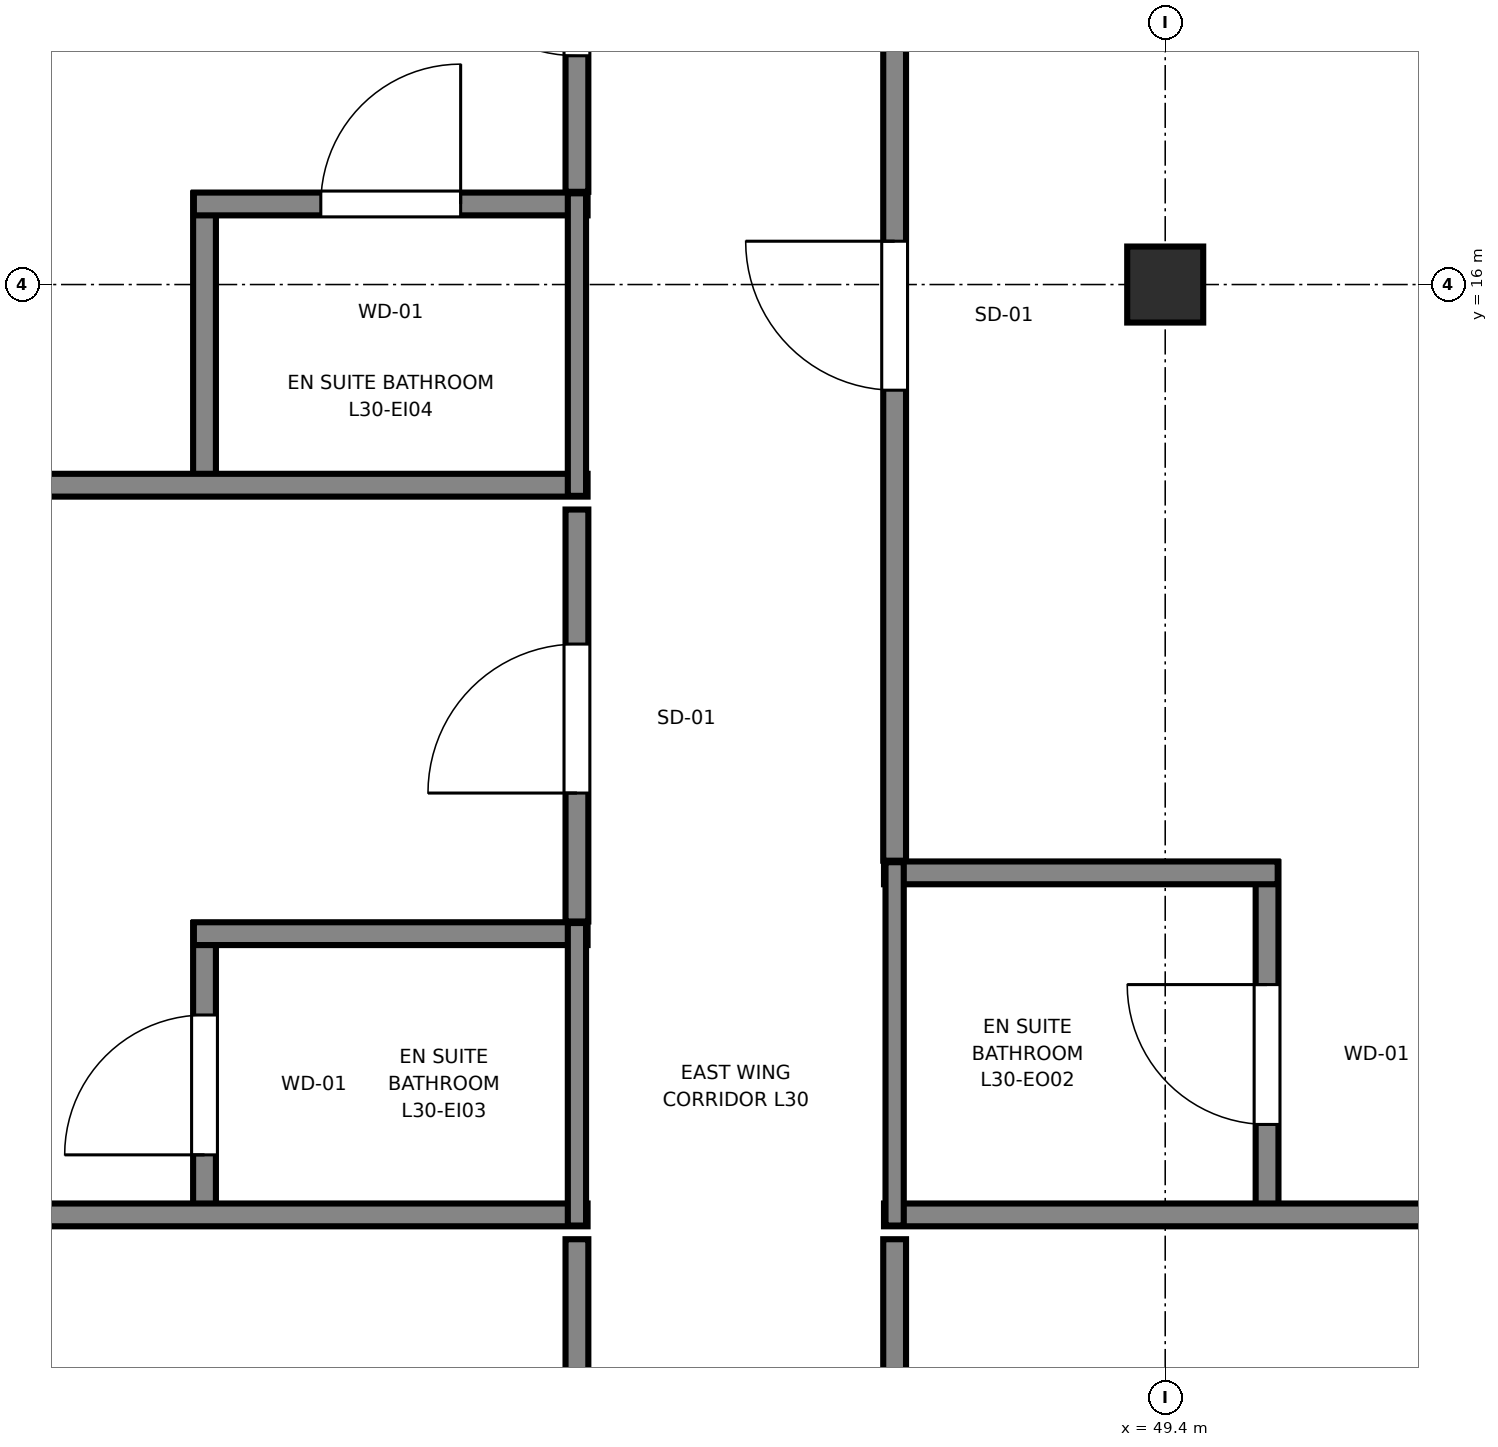
"""IFC4 building model, lengths in metres.
Left out: names, types, materials, properties, quantities, classifications, styles, units other than length and angle.
Written with IfcOpenShell. Run it as: python <this file> out.ifc"""

import sys

from ifc_helpers import new_model, si_unit, direction, frame, frame_2d, origin, origin_2d, place, context, subcontext, project, spatial, rectangle, i_section, extrude, source, transform, mapped, element, fill, save


model = new_model("IFC4")
c1 = context("Model", 3, precision=1e-05, world=origin(), true_north=direction((0.0, 1.0)))
c2 = subcontext(c1, "Body", "Model", "MODEL_VIEW")
j1 = project(units=[si_unit("LENGTHUNIT", "METRE"), si_unit("PLANEANGLEUNIT", "RADIAN")], contexts=[c1])
p1 = place(None, origin())
s1 = spatial("IfcSite", under=j1, at=p1, CompositionType="ELEMENT")
p2 = place(p1, origin())
s2 = spatial("IfcBuilding", under=s1, at=p2, CompositionType="ELEMENT")
p3 = place(p2, frame((0.0, 0.0, 118.65)))
s3 = spatial("IfcBuildingStorey", under=s2, at=p3, CompositionType="ELEMENT", Elevation=118.65)
m1 = source(origin(), c2, "Body", "SweptSolid", [
    extrude(i_section(OverallWidth=0.5, OverallDepth=0.5, WebThickness=0.022, FlangeThickness=0.034, at=origin_2d()), origin(), (0.0, 0.0, 1.0), 3.55),
])
p4 = place(p3, frame((49.4, 16.0, 0.0), z_axis=(0.0, 0.0, 1.0), x_axis=(1.0, 0.0, 0.0)))
e1 = element("IfcColumn", 1, at=p4, inside=s3, PredefinedType="COLUMN", context=c2, shape_type="MappedRepresentation", body=[
    mapped(m1, transform((0.0, 0.0, 0.0), x_axis=(1.0, 0.0, 0.0), y_axis=(0.0, 1.0, 0.0), z_axis=(0.0, 0.0, 1.0), scale=1.0)),
])
p5 = place(p3, frame((43.08, 9.81, 0.0), z_axis=(0.0, 0.0, 1.0), x_axis=(0.0, 1.0, 0.0)))
e2 = element("IfcWall", 2, at=p5, inside=s3, PredefinedType="PARTITIONING", context=c2, shape_type="SweptSolid", body=[
    extrude(rectangle(XDim=1.99, YDim=0.15, at=frame_2d((0.995, 0.0))), origin(), (0.0, 0.0, 1.0), 3.37),
])
p6 = place(p5, frame((0.465, 0.0, 0.0)))
e3 = element("IfcOpeningElement", 3, at=p6, cuts=e2, PredefinedType="OPENING", context=c2, shape_type="SweptSolid", body=[
    extrude(rectangle(XDim=0.92, YDim=2.01, at=frame_2d((0.46, 1.005))), frame((0.0, 0.085, 0.0), z_axis=(0.0, -1.0, 0.0), x_axis=(1.0, 0.0, 0.0)), (0.0, 0.0, 1.0), 0.17),
])
p7 = place(p3, frame((34.65, 9.88, 0.0), z_axis=(0.0, 0.0, 1.0), x_axis=(1.0, 0.0, 0.0)))
e4 = element("IfcWall", 4, at=p7, inside=s3, PredefinedType="PARTITIONING", context=c2, shape_type="SweptSolid", body=[
    extrude(rectangle(XDim=10.95, YDim=0.15, at=frame_2d((5.475, 0.0))), origin(), (0.0, 0.0, 1.0), 3.37),
])
p8 = place(p3, frame((43.01, 11.73, 0.0), z_axis=(0.0, 0.0, 1.0), x_axis=(1.0, 0.0, 0.0)))
e5 = element("IfcWall", 5, at=p8, inside=s3, PredefinedType="PARTITIONING", context=c2, shape_type="SweptSolid", body=[
    extrude(rectangle(XDim=2.59, YDim=0.15, at=frame_2d((1.295, 0.0))), origin(), (0.0, 0.0, 1.0), 3.37),
])
p9 = place(p3, frame((45.53, 9.81, 0.0), z_axis=(0.0, 0.0, 1.0), x_axis=(0.0, 1.0, 0.0)))
e6 = element("IfcWall", 6, at=p9, inside=s3, PredefinedType="PLUMBINGWALL", context=c2, shape_type="SweptSolid", body=[
    extrude(rectangle(XDim=1.99, YDim=0.12, at=frame_2d((0.995, 0.0))), origin(), (0.0, 0.0, 1.0), 2.954),
])
p10 = place(p3, frame((43.08, 14.61, 0.0), z_axis=(0.0, 0.0, 1.0), x_axis=(0.0, 1.0, 0.0)))
e7 = element("IfcWall", 7, at=p10, inside=s3, PredefinedType="PARTITIONING", context=c2, shape_type="SweptSolid", body=[
    extrude(rectangle(XDim=1.99, YDim=0.15, at=frame_2d((0.995, 0.0))), origin(), (0.0, 0.0, 1.0), 3.37),
])
p11 = place(p3, frame((34.65, 14.68, 0.0), z_axis=(0.0, 0.0, 1.0), x_axis=(1.0, 0.0, 0.0)))
e8 = element("IfcWall", 8, at=p11, inside=s3, PredefinedType="PARTITIONING", context=c2, shape_type="SweptSolid", body=[
    extrude(rectangle(XDim=10.95, YDim=0.15, at=frame_2d((5.475, 0.0))), origin(), (0.0, 0.0, 1.0), 3.37),
])
p12 = place(p3, frame((43.01, 16.53, 0.0), z_axis=(0.0, 0.0, 1.0), x_axis=(1.0, 0.0, 0.0)))
e9 = element("IfcWall", 9, at=p12, inside=s3, PredefinedType="PARTITIONING", context=c2, shape_type="SweptSolid", body=[
    extrude(rectangle(XDim=2.59, YDim=0.15, at=frame_2d((1.295, 0.0))), origin(), (0.0, 0.0, 1.0), 3.37),
])
p13 = place(p12, frame((0.835, 0.0, 0.0)))
e10 = element("IfcOpeningElement", 10, at=p13, cuts=e9, PredefinedType="OPENING", context=c2, shape_type="SweptSolid", body=[
    extrude(rectangle(XDim=0.92, YDim=2.01, at=frame_2d((0.46, 1.005))), frame((0.0, 0.085, 0.0), z_axis=(0.0, -1.0, 0.0), x_axis=(1.0, 0.0, 0.0)), (0.0, 0.0, 1.0), 0.17),
])
p14 = place(p3, frame((45.53, 14.61, 0.0), z_axis=(0.0, 0.0, 1.0), x_axis=(0.0, 1.0, 0.0)))
e11 = element("IfcWall", 11, at=p14, inside=s3, PredefinedType="PLUMBINGWALL", context=c2, shape_type="SweptSolid", body=[
    extrude(rectangle(XDim=1.99, YDim=0.12, at=frame_2d((0.995, 0.0))), origin(), (0.0, 0.0, 1.0), 2.954),
])
p15 = place(p3, frame((50.07, 9.81, 0.0), z_axis=(0.0, 0.0, 1.0), x_axis=(0.0, 1.0, 0.0)))
e12 = element("IfcWall", 12, at=p15, inside=s3, PredefinedType="PARTITIONING", context=c2, shape_type="SweptSolid", body=[
    extrude(rectangle(XDim=2.39, YDim=0.15, at=frame_2d((1.195, 0.0))), origin(), (0.0, 0.0, 1.0), 3.37),
])
p16 = place(p15, frame((0.665, 0.0, 0.0)))
e13 = element("IfcOpeningElement", 13, at=p16, cuts=e12, PredefinedType="OPENING", context=c2, shape_type="SweptSolid", body=[
    extrude(rectangle(XDim=0.92, YDim=2.01, at=frame_2d((0.46, 1.005))), frame((0.0, 0.085, 0.0), z_axis=(0.0, -1.0, 0.0), x_axis=(1.0, 0.0, 0.0)), (0.0, 0.0, 1.0), 0.17),
])
p17 = place(p3, frame((47.55, 9.88, 0.0), z_axis=(0.0, 0.0, 1.0), x_axis=(1.0, 0.0, 0.0)))
e14 = element("IfcWall", 14, at=p17, inside=s3, PredefinedType="PARTITIONING", context=c2, shape_type="SweptSolid", body=[
    extrude(rectangle(XDim=9.045, YDim=0.15, at=frame_2d((4.522, 0.0))), origin(), (0.0, 0.0, 1.0), 3.37),
])
p18 = place(p3, frame((47.55, 12.13, 0.0), z_axis=(0.0, 0.0, 1.0), x_axis=(1.0, 0.0, 0.0)))
e15 = element("IfcWall", 15, at=p18, inside=s3, PredefinedType="PARTITIONING", context=c2, shape_type="SweptSolid", body=[
    extrude(rectangle(XDim=2.59, YDim=0.15, at=frame_2d((1.295, 0.0))), origin(), (0.0, 0.0, 1.0), 3.37),
])
p19 = place(p3, frame((47.62, 9.81, 0.0), z_axis=(0.0, 0.0, 1.0), x_axis=(0.0, 1.0, 0.0)))
e16 = element("IfcWall", 16, at=p19, inside=s3, PredefinedType="PLUMBINGWALL", context=c2, shape_type="SweptSolid", body=[
    extrude(rectangle(XDim=2.39, YDim=0.12, at=frame_2d((1.195, 0.0))), origin(), (0.0, 0.0, 1.0), 3.37),
])
p20 = place(p3, frame((45.53, 6.91, 0.0), z_axis=(0.0, 0.0, 1.0), x_axis=(0.0, 1.0, 0.0)))
e17 = element("IfcWall", 17, at=p20, inside=s3, PredefinedType="PARTITIONING", context=c2, shape_type="SweptSolid", body=[
    extrude(rectangle(XDim=2.81, YDim=0.15, at=frame_2d((1.405, 0.0))), origin(), (0.0, 0.0, 1.0), 2.954),
])
p21 = place(p20, frame((0.895, 0.0, 0.0)))
e18 = element("IfcOpeningElement", 18, at=p21, cuts=e17, PredefinedType="OPENING", context=c2, shape_type="SweptSolid", body=[
    extrude(rectangle(XDim=0.98, YDim=2.12, at=frame_2d((0.49, 1.06))), frame((0.0, 0.085, 0.0), z_axis=(0.0, -1.0, 0.0), x_axis=(1.0, 0.0, 0.0)), (0.0, 0.0, 1.0), 0.17),
])
p22 = place(p3, frame((45.53, 11.81, 0.0), z_axis=(0.0, 0.0, 1.0), x_axis=(0.0, 1.0, 0.0)))
e19 = element("IfcWall", 19, at=p22, inside=s3, PredefinedType="PARTITIONING", context=c2, shape_type="SweptSolid", body=[
    extrude(rectangle(XDim=2.71, YDim=0.15, at=frame_2d((1.355, 0.0))), origin(), (0.0, 0.0, 1.0), 2.954),
])
p23 = place(p22, frame((0.845, 0.0, 0.0)))
e20 = element("IfcOpeningElement", 20, at=p23, cuts=e19, PredefinedType="OPENING", context=c2, shape_type="SweptSolid", body=[
    extrude(rectangle(XDim=0.98, YDim=2.12, at=frame_2d((0.49, 1.06))), frame((0.0, 0.085, 0.0), z_axis=(0.0, -1.0, 0.0), x_axis=(1.0, 0.0, 0.0)), (0.0, 0.0, 1.0), 0.17),
])
p24 = place(p3, frame((45.53, 16.61, 0.0), z_axis=(0.0, 0.0, 1.0), x_axis=(0.0, 1.0, 0.0)))
e21 = element("IfcWall", 21, at=p24, inside=s3, PredefinedType="PARTITIONING", context=c2, shape_type="SweptSolid", body=[
    extrude(rectangle(XDim=2.81, YDim=0.15, at=frame_2d((1.405, 0.0))), origin(), (0.0, 0.0, 1.0), 2.954),
])
p25 = place(p24, frame((0.895, 0.0, 0.0)))
e22 = element("IfcOpeningElement", 22, at=p25, cuts=e21, PredefinedType="OPENING", context=c2, shape_type="SweptSolid", body=[
    extrude(rectangle(XDim=0.98, YDim=2.12, at=frame_2d((0.49, 1.06))), frame((0.0, 0.085, 0.0), z_axis=(0.0, -1.0, 0.0), x_axis=(1.0, 0.0, 0.0)), (0.0, 0.0, 1.0), 0.17),
])
p26 = place(p3, frame((47.62, 3.31, 0.0), z_axis=(0.0, 0.0, 1.0), x_axis=(0.0, 1.0, 0.0)))
e23 = element("IfcWall", 23, at=p26, inside=s3, PredefinedType="PARTITIONING", context=c2, shape_type="SweptSolid", body=[
    extrude(rectangle(XDim=6.41, YDim=0.15, at=frame_2d((3.205, 0.0))), origin(), (0.0, 0.0, 1.0), 3.37),
])
p27 = place(p26, frame((2.695, 0.0, 0.0)))
e24 = element("IfcOpeningElement", 24, at=p27, cuts=e23, PredefinedType="OPENING", context=c2, shape_type="SweptSolid", body=[
    extrude(rectangle(XDim=0.98, YDim=2.12, at=frame_2d((0.49, 1.06))), frame((0.0, 0.085, 0.0), z_axis=(0.0, -1.0, 0.0), x_axis=(1.0, 0.0, 0.0)), (0.0, 0.0, 1.0), 0.17),
])
p28 = place(p3, frame((47.62, 12.21, 0.0), z_axis=(0.0, 0.0, 1.0), x_axis=(0.0, 1.0, 0.0)))
e25 = element("IfcWall", 25, at=p28, inside=s3, PredefinedType="PARTITIONING", context=c2, shape_type="SweptSolid", body=[
    extrude(rectangle(XDim=7.21, YDim=0.15, at=frame_2d((3.605, 0.0))), origin(), (0.0, 0.0, 1.0), 3.37),
])
p29 = place(p28, frame((3.095, 0.0, 0.0)))
e26 = element("IfcOpeningElement", 26, at=p29, cuts=e25, PredefinedType="OPENING", context=c2, shape_type="SweptSolid", body=[
    extrude(rectangle(XDim=0.98, YDim=2.12, at=frame_2d((0.49, 1.06))), frame((0.0, 0.085, 0.0), z_axis=(0.0, -1.0, 0.0), x_axis=(1.0, 0.0, 0.0)), (0.0, 0.0, 1.0), 0.17),
])
m2 = source(origin(), c2, "Body", "SweptSolid", [
    extrude(rectangle(XDim=0.92, YDim=2.01, at=frame_2d((0.46, 1.005))), frame((0.0, 0.025, 0.0), z_axis=(0.0, -1.0, 0.0), x_axis=(1.0, 0.0, 0.0)), (0.0, 0.0, 1.0), 0.05),
])
p30 = place(p6, origin())
e27 = element("IfcDoor", 27, at=p30, inside=s3, OperationType="SINGLE_SWING_LEFT", PredefinedType="DOOR", context=c2, shape_type="MappedRepresentation", body=[
    mapped(m2, transform((0.0, 0.0, 0.0), x_axis=(1.0, 0.0, 0.0), y_axis=(0.0, 1.0, 0.0), z_axis=(0.0, 0.0, 1.0), scale=1.0)),
])
fill(e3, e27)
p31 = place(p13, origin())
e28 = element("IfcDoor", 28, at=p31, inside=s3, OperationType="SINGLE_SWING_RIGHT", PredefinedType="DOOR", context=c2, shape_type="MappedRepresentation", body=[
    mapped(m2, transform((0.0, 0.0, 0.0), x_axis=(1.0, 0.0, 0.0), y_axis=(0.0, 1.0, 0.0), z_axis=(0.0, 0.0, 1.0), scale=1.0)),
])
fill(e10, e28)
p32 = place(p16, origin())
e29 = element("IfcDoor", 29, at=p32, inside=s3, OperationType="SINGLE_SWING_RIGHT", PredefinedType="DOOR", context=c2, shape_type="MappedRepresentation", body=[
    mapped(m2, transform((0.0, 0.0, 0.0), x_axis=(1.0, 0.0, 0.0), y_axis=(0.0, 1.0, 0.0), z_axis=(0.0, 0.0, 1.0), scale=1.0)),
])
fill(e13, e29)
m3 = source(origin(), c2, "Body", "SweptSolid", [
    extrude(rectangle(XDim=0.98, YDim=2.12, at=frame_2d((0.49, 1.06))), frame((0.0, 0.025, 0.0), z_axis=(0.0, -1.0, 0.0), x_axis=(1.0, 0.0, 0.0)), (0.0, 0.0, 1.0), 0.05),
])
p33 = place(p23, origin())
e30 = element("IfcDoor", 30, at=p33, inside=s3, OperationType="SINGLE_SWING_LEFT", PredefinedType="DOOR", context=c2, shape_type="MappedRepresentation", body=[
    mapped(m3, transform((0.0, 0.0, 0.0), x_axis=(1.0, 0.0, 0.0), y_axis=(0.0, 1.0, 0.0), z_axis=(0.0, 0.0, 1.0), scale=1.0)),
])
fill(e20, e30)
p34 = place(p25, origin())
e31 = element("IfcDoor", 31, at=p34, inside=s3, OperationType="SINGLE_SWING_RIGHT", PredefinedType="DOOR", context=c2, shape_type="MappedRepresentation", body=[
    mapped(m3, transform((0.0, 0.0, 0.0), x_axis=(1.0, 0.0, 0.0), y_axis=(0.0, 1.0, 0.0), z_axis=(0.0, 0.0, 1.0), scale=1.0)),
])
fill(e22, e31)
p35 = place(p29, origin())
e32 = element("IfcDoor", 32, at=p35, inside=s3, OperationType="SINGLE_SWING_RIGHT", PredefinedType="DOOR", context=c2, shape_type="MappedRepresentation", body=[
    mapped(m3, transform((0.0, 0.0, 0.0), x_axis=(1.0, 0.0, 0.0), y_axis=(0.0, 1.0, 0.0), z_axis=(0.0, 0.0, 1.0), scale=1.0)),
])
fill(e26, e32)
save(model, sys.argv[1])
